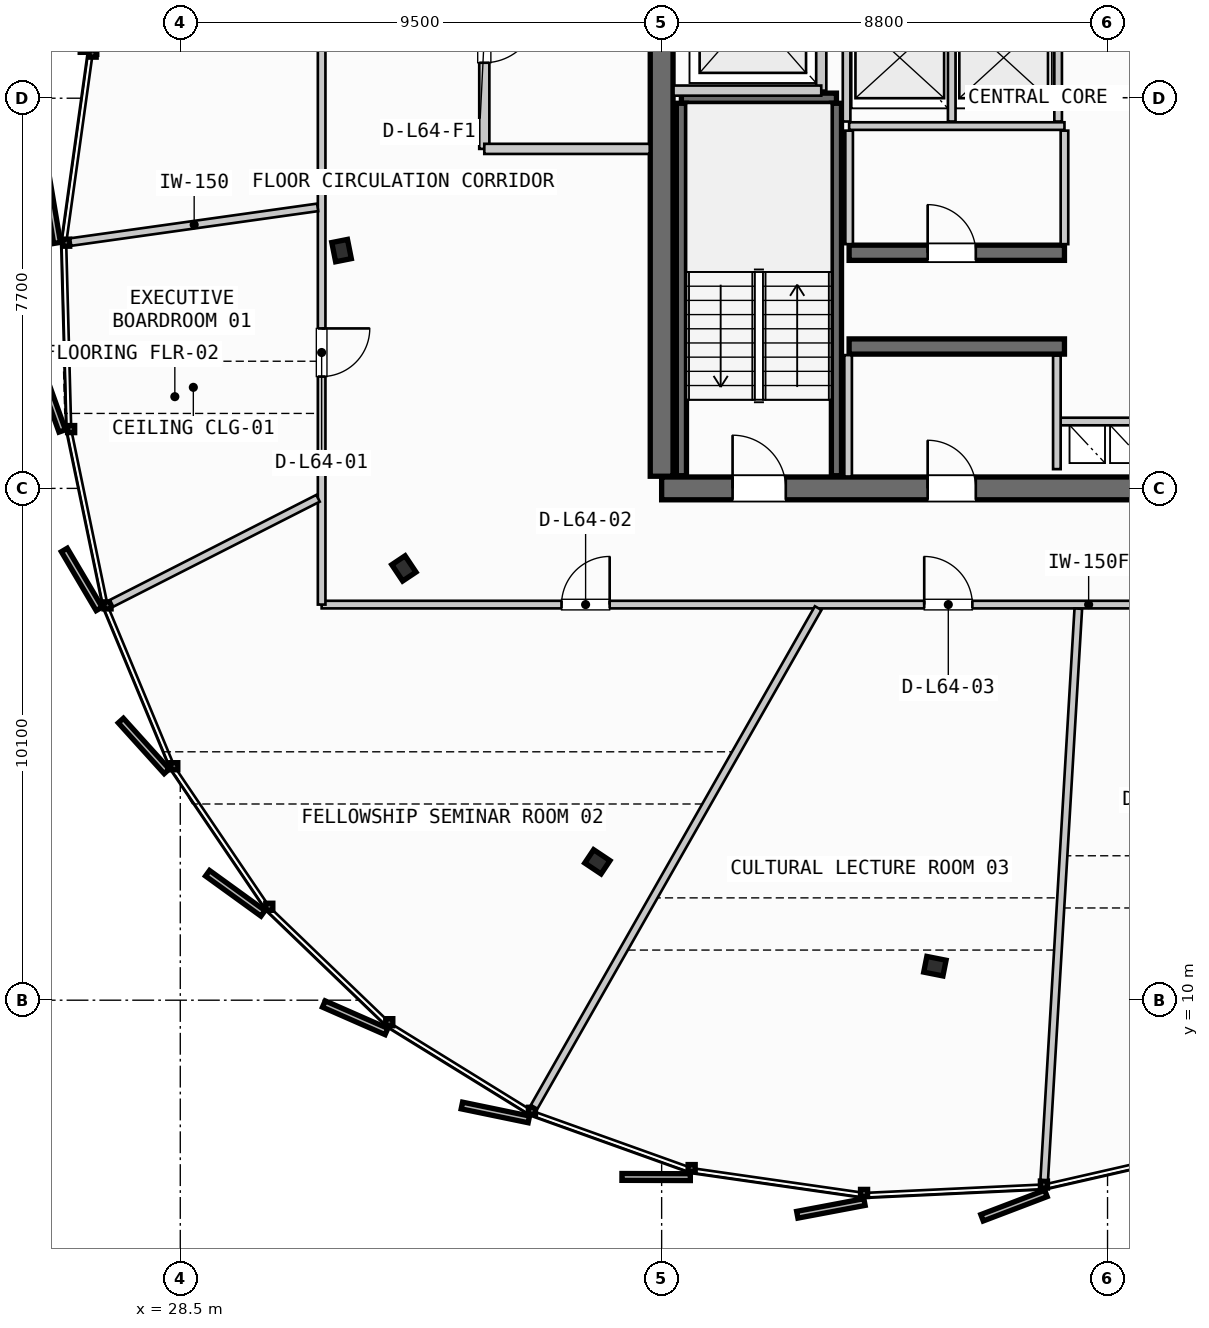
"""IFC4 building model, lengths in metres.
Left out: names, types, materials, properties, quantities, classifications, styles, units other than length and angle.
Written with IfcOpenShell. Run it as: python <this file> out.ifc"""

import sys

from ifc_helpers import new_model, si_unit, direction, frame, frame_2d, origin, origin_2d, place, context, subcontext, project, spatial, rectangle, i_section, extrude, source, transform, mapped, element, fill, save


model = new_model("IFC4")
c1 = context("Model", 3, precision=1e-05, world=origin(), true_north=direction((0.0, 1.0)))
c2 = subcontext(c1, "Body", "Model", "MODEL_VIEW")
j1 = project(units=[si_unit("LENGTHUNIT", "METRE"), si_unit("PLANEANGLEUNIT", "RADIAN")], contexts=[c1])
p1 = place(None, origin())
s1 = spatial("IfcSite", under=j1, at=p1, CompositionType="ELEMENT")
p2 = place(p1, origin())
s2 = spatial("IfcBuilding", under=s1, at=p2, CompositionType="ELEMENT")
p3 = place(p2, frame((0.0, 0.0, 245.65)))
s3 = spatial("IfcBuildingStorey", under=s2, at=p3, CompositionType="ELEMENT", Elevation=245.65)
p4 = place(p3, frame((38.0, 20.1, 0.0), z_axis=(0.0, 0.0, 1.0), x_axis=(1.0, 0.0, 0.0)))
e1 = element("IfcWall", 1, at=p4, inside=s3, PredefinedType="SHEAR", context=c2, shape_type="SweptSolid", body=[
    extrude(rectangle(XDim=17.6, YDim=0.45, at=frame_2d((8.8, 0.0))), origin(), (0.0, 0.0, 1.0), 3.21),
])
p5 = place(p4, frame((1.4, 0.0, 0.0)))
e2 = element("IfcOpeningElement", 2, at=p5, cuts=e1, PredefinedType="OPENING", context=c2, shape_type="SweptSolid", body=[
    extrude(rectangle(XDim=1.05, YDim=2.15, at=frame_2d((0.525, 1.075))), frame((0.0, 0.235, 0.0), z_axis=(0.0, -1.0, 0.0), x_axis=(1.0, 0.0, 0.0)), (0.0, 0.0, 1.0), 0.47),
])
p6 = place(p4, frame((15.15, 0.0, 0.0)))
e3 = element("IfcOpeningElement", 3, at=p6, cuts=e1, PredefinedType="OPENING", context=c2, shape_type="SweptSolid", body=[
    extrude(rectangle(XDim=1.05, YDim=2.15, at=frame_2d((0.525, 1.075))), frame((0.0, 0.235, 0.0), z_axis=(0.0, -1.0, 0.0), x_axis=(1.0, 0.0, 0.0)), (0.0, 0.0, 1.0), 0.47),
])
p7 = place(p4, frame((5.25, 0.0, 0.0)))
e4 = element("IfcOpeningElement", 4, at=p7, cuts=e1, PredefinedType="OPENING", context=c2, shape_type="SweptSolid", body=[
    extrude(rectangle(XDim=0.95, YDim=2.15, at=frame_2d((0.475, 1.075))), frame((0.0, 0.235, 0.0), z_axis=(0.0, -1.0, 0.0), x_axis=(1.0, 0.0, 0.0)), (0.0, 0.0, 1.0), 0.47),
])
p8 = place(p4, frame((11.4, 0.0, 0.0)))
e5 = element("IfcOpeningElement", 5, at=p8, cuts=e1, PredefinedType="OPENING", context=c2, shape_type="SweptSolid", body=[
    extrude(rectangle(XDim=0.95, YDim=2.15, at=frame_2d((0.475, 1.075))), frame((0.0, 0.235, 0.0), z_axis=(0.0, -1.0, 0.0), x_axis=(1.0, 0.0, 0.0)), (0.0, 0.0, 1.0), 0.47),
])
p9 = place(p3, frame((38.0, 35.26, 0.0), z_axis=(0.0, 0.0, 1.0), x_axis=(0.0, -1.0, 0.0)))
e6 = element("IfcWall", 6, at=p9, inside=s3, PredefinedType="SHEAR", context=c2, shape_type="SweptSolid", body=[
    extrude(rectangle(XDim=14.92, YDim=0.45, at=frame_2d((7.46, 0.0))), origin(), (0.0, 0.0, 1.0), 3.21),
])
p10 = place(p9, frame((5.21, 0.0, 0.0)))
e7 = element("IfcOpeningElement", 7, at=p10, cuts=e6, PredefinedType="OPENING", context=c2, shape_type="SweptSolid", body=[
    extrude(rectangle(XDim=1.1, YDim=2.2, at=frame_2d((0.55, 1.1))), frame((0.0, 0.235, 0.0), z_axis=(0.0, -1.0, 0.0), x_axis=(1.0, 0.0, 0.0)), (0.0, 0.0, 1.0), 0.47),
])
p11 = place(p3, frame((41.7, 22.9, 0.0), z_axis=(0.0, 0.0, 1.0), x_axis=(1.0, 0.0, 0.0)))
e8 = element("IfcWall", 8, at=p11, inside=s3, PredefinedType="SHEAR", context=c2, shape_type="SweptSolid", body=[
    extrude(rectangle(XDim=4.25, YDim=0.3, at=frame_2d((2.125, 0.0))), origin(), (0.0, 0.0, 1.0), 3.21),
])
p12 = place(p3, frame((41.7, 24.75, 0.0), z_axis=(0.0, 0.0, 1.0), x_axis=(1.0, 0.0, 0.0)))
e9 = element("IfcWall", 9, at=p12, inside=s3, PredefinedType="SHEAR", context=c2, shape_type="SweptSolid", body=[
    extrude(rectangle(XDim=4.25, YDim=0.3, at=frame_2d((2.125, 0.0))), origin(), (0.0, 0.0, 1.0), 3.21),
])
p13 = place(p12, frame((1.55, 0.0, 0.0)))
e10 = element("IfcOpeningElement", 10, at=p13, cuts=e9, PredefinedType="OPENING", context=c2, shape_type="SweptSolid", body=[
    extrude(rectangle(XDim=0.95, YDim=2.15, at=frame_2d((0.475, 1.075))), frame((0.0, 0.16, 0.0), z_axis=(0.0, -1.0, 0.0), x_axis=(1.0, 0.0, 0.0)), (0.0, 0.0, 1.0), 0.32),
])
m1 = source(origin(), c2, "Body", "SweptSolid", [
    extrude(i_section(OverallWidth=0.387, OverallDepth=0.316, WebThickness=0.019, FlangeThickness=0.028, FilletRadius=0.015, at=origin_2d()), origin(), (0.0, 0.0, 1.0), 3.21),
])
for number, where, z_axis, x_axis in (
    (11, (31.683, 24.793, 0.0), (0.0, 0.0, 1.0), (-0.981, -0.195, 0.0)),
    (12, (32.913, 18.521, 0.0), (0.0, 0.0, 1.0), (-0.831, -0.556, 0.0)),
    (13, (36.731, 12.731, 0.0), (0.0, 0.0, 1.0), (-0.556, -0.831, 0.0)),
    (14, (43.393, 10.671, 0.0), (0.0, 0.0, 1.0), (-0.195, -0.981, 0.0)),
):
    element("IfcColumn", number, at=place(p3, frame(where, z_axis=z_axis, x_axis=x_axis)), inside=s3, PredefinedType="COLUMN", context=c2, shape_type="MappedRepresentation", body=[
        mapped(m1, transform((0.0, 0.0, 0.0), scale=1.0)),
    ])
p14 = place(p3, frame((38.39, 27.8, 0.0), z_axis=(0.0, 0.0, 1.0), x_axis=(1.0, 0.0, 0.0)))
e15 = element("IfcWall", 15, at=p14, inside=s3, PredefinedType="SHEAR", context=c2, shape_type="SweptSolid", body=[
    extrude(rectangle(XDim=3.06, YDim=0.2, at=frame_2d((1.53, 0.0))), origin(), (0.0, 0.0, 1.0), 3.21),
])
for number, where, z_axis, x_axis in (
    (16, (41.45, 27.7, 0.0), (0.0, 0.0, 1.0), (0.0, -1.0, 0.0)),
    (17, (38.39, 20.35, 0.0), (0.0, 0.0, 1.0), (0.0, 1.0, 0.0)),
):
    element("IfcWall", number, at=place(p3, frame(where, z_axis=z_axis, x_axis=x_axis)), inside=s3, PredefinedType="SHEAR", context=c2, shape_type="SweptSolid", body=[
        extrude(rectangle(XDim=7.35, YDim=0.2, at=frame_2d((3.675, 0.0))), origin(), (0.0, 0.0, 1.0), 3.21),
    ])
p15 = place(p3, frame((45.8, 21.42, 0.0), z_axis=(0.0, 0.0, 1.0), x_axis=(1.0, 0.0, 0.0)))
e18 = element("IfcWall", 18, at=p15, inside=s3, PredefinedType="PARTITIONING", context=c2, shape_type="SweptSolid", body=[
    extrude(rectangle(XDim=2.0, YDim=0.15, at=frame_2d((1.0, 0.0))), origin(), (0.0, 0.0, 1.0), 2.28),
])
p16 = place(p3, frame((45.8, 20.48, 0.0), z_axis=(0.0, 0.0, 1.0), x_axis=(0.0, 1.0, 0.0)))
e19 = element("IfcWall", 19, at=p16, inside=s3, PredefinedType="PARTITIONING", context=c2, shape_type="SweptSolid", body=[
    extrude(rectangle(XDim=2.24, YDim=0.15, at=frame_2d((1.12, 0.0))), origin(), (0.0, 0.0, 1.0), 2.28),
])
p17 = place(p3, frame((41.15, 27.95, 0.0), z_axis=(0.0, 0.0, 1.0), x_axis=(0.0, 1.0, 0.0)))
e20 = element("IfcWall", 20, at=p17, inside=s3, PredefinedType="PARTITIONING", context=c2, shape_type="SweptSolid", body=[
    extrude(rectangle(XDim=3.1, YDim=0.2, at=frame_2d((1.55, 0.0))), origin(), (0.0, 0.0, 1.0), 2.28),
])
p18 = place(p3, frame((38.235, 27.95, 0.0), z_axis=(0.0, 0.0, 1.0), x_axis=(1.0, 0.0, 0.0)))
e21 = element("IfcWall", 21, at=p18, inside=s3, PredefinedType="PARTITIONING", context=c2, shape_type="SweptSolid", body=[
    extrude(rectangle(XDim=2.915, YDim=0.2, at=frame_2d((1.458, 0.0))), origin(), (0.0, 0.0, 1.0), 2.28),
])
p19 = place(p3, frame((34.5, 31.2, 0.0), z_axis=(0.0, 0.0, 1.0), x_axis=(0.0, -1.0, 0.0)))
e22 = element("IfcWall", 22, at=p19, inside=s3, PredefinedType="PARTITIONING", context=c2, shape_type="SweptSolid", body=[
    extrude(rectangle(XDim=4.4, YDim=0.2, at=frame_2d((2.2, 0.0))), origin(), (0.0, 0.0, 1.0), 2.28),
])
p20 = place(p19, frame((1.65, 0.0, 0.0)))
e23 = element("IfcOpeningElement", 23, at=p20, cuts=e22, PredefinedType="OPENING", context=c2, shape_type="SweptSolid", body=[
    extrude(rectangle(XDim=1.05, YDim=2.15, at=frame_2d((0.525, 1.075))), frame((0.0, 0.11, 0.0), z_axis=(0.0, -1.0, 0.0), x_axis=(1.0, 0.0, 0.0)), (0.0, 0.0, 1.0), 0.22),
])
p21 = place(p3, frame((34.5, 26.8, 0.0), z_axis=(0.0, 0.0, 1.0), x_axis=(1.0, 0.0, 0.0)))
e24 = element("IfcWall", 24, at=p21, inside=s3, PredefinedType="PARTITIONING", context=c2, shape_type="SweptSolid", body=[
    extrude(rectangle(XDim=3.265, YDim=0.2, at=frame_2d((1.632, 0.0))), origin(), (0.0, 0.0, 1.0), 2.28),
])
p22 = place(p3, frame((41.68, 20.335, 0.0), z_axis=(0.0, 0.0, 1.0), x_axis=(0.0, 1.0, 0.0)))
e25 = element("IfcWall", 25, at=p22, inside=s3, PredefinedType="PARTITIONING", context=c2, shape_type="SweptSolid", body=[
    extrude(rectangle(XDim=2.395, YDim=0.15, at=frame_2d((1.198, 0.0))), origin(), (0.0, 0.0, 1.0), 2.28),
])
p23 = place(p3, frame((41.7, 27.25, 0.0), z_axis=(0.0, 0.0, 1.0), x_axis=(1.0, 0.0, 0.0)))
e26 = element("IfcWall", 26, at=p23, inside=s3, PredefinedType="PARTITIONING", context=c2, shape_type="SweptSolid", body=[
    extrude(rectangle(XDim=4.25, YDim=0.15, at=frame_2d((2.125, 0.0))), origin(), (0.0, 0.0, 1.0), 2.28),
])
for number, where, z_axis, x_axis in (
    (27, (41.7, 24.92, 0.0), (0.0, 0.0, 1.0), (0.0, 1.0, 0.0)),
    (28, (45.95, 24.92, 0.0), (0.0, 0.0, 1.0), (0.0, 1.0, 0.0)),
):
    element("IfcWall", number, at=place(p3, frame(where, z_axis=z_axis, x_axis=x_axis)), inside=s3, PredefinedType="PARTITIONING", context=c2, shape_type="SweptSolid", body=[
        extrude(rectangle(XDim=2.24, YDim=0.15, at=frame_2d((1.12, 0.0))), origin(), (0.0, 0.0, 1.0), 2.28),
    ])
for number, where, z_axis, x_axis in (
    (29, (41.65, 27.34, 0.0), (0.0, 0.0, 1.0), (0.0, 1.0, 0.0)),
    (30, (43.725, 27.34, 0.0), (0.0, 0.0, 1.0), (0.0, 1.0, 0.0)),
    (31, (45.825, 27.34, 0.0), (0.0, 0.0, 1.0), (0.0, 1.0, 0.0)),
):
    element("IfcWall", number, at=place(p3, frame(where, z_axis=z_axis, x_axis=x_axis)), inside=s3, PredefinedType="PARTITIONING", context=c2, shape_type="SweptSolid", body=[
        extrude(rectangle(XDim=2.34, YDim=0.15, at=frame_2d((1.17, 0.0))), origin(), (0.0, 0.0, 1.0), 2.28),
    ])
p24 = place(p3, frame((31.29, 17.807, 0.0), z_axis=(0.0, 0.0, 1.0), x_axis=(1.0, 0.0, 0.0)))
e32 = element("IfcWall", 32, at=p24, inside=s3, PredefinedType="PARTITIONING", context=c2, shape_type="SweptSolid", body=[
    extrude(rectangle(XDim=30.274, YDim=0.15, at=frame_2d((15.137, 0.0))), origin(), (0.0, 0.0, 1.0), 2.28),
])
p25 = place(p24, frame((4.734, 0.0, 0.0)))
e33 = element("IfcOpeningElement", 33, at=p25, cuts=e32, PredefinedType="OPENING", context=c2, shape_type="SweptSolid", body=[
    extrude(rectangle(XDim=0.95, YDim=2.15, at=frame_2d((0.475, 1.075))), frame((0.0, 0.085, 0.0), z_axis=(0.0, -1.0, 0.0), x_axis=(1.0, 0.0, 0.0)), (0.0, 0.0, 1.0), 0.17),
])
p26 = place(p24, frame((11.892, 0.0, 0.0)))
e34 = element("IfcOpeningElement", 34, at=p26, cuts=e32, PredefinedType="OPENING", context=c2, shape_type="SweptSolid", body=[
    extrude(rectangle(XDim=0.95, YDim=2.15, at=frame_2d((0.475, 1.075))), frame((0.0, 0.085, 0.0), z_axis=(0.0, -1.0, 0.0), x_axis=(1.0, 0.0, 0.0)), (0.0, 0.0, 1.0), 0.17),
])
p27 = place(p24, frame((17.453, 0.0, 0.0)))
e35 = element("IfcOpeningElement", 35, at=p27, cuts=e32, PredefinedType="OPENING", context=c2, shape_type="SweptSolid", body=[
    extrude(rectangle(XDim=0.95, YDim=2.15, at=frame_2d((0.475, 1.075))), frame((0.0, 0.085, 0.0), z_axis=(0.0, -1.0, 0.0), x_axis=(1.0, 0.0, 0.0)), (0.0, 0.0, 1.0), 0.17),
])
p28 = place(p24, frame((24.251, 0.0, 0.0)))
e36 = element("IfcOpeningElement", 36, at=p28, cuts=e32, PredefinedType="OPENING", context=c2, shape_type="SweptSolid", body=[
    extrude(rectangle(XDim=0.95, YDim=2.15, at=frame_2d((0.475, 1.075))), frame((0.0, 0.085, 0.0), z_axis=(0.0, -1.0, 0.0), x_axis=(1.0, 0.0, 0.0)), (0.0, 0.0, 1.0), 0.17),
])
p29 = place(p3, frame((31.29, 37.793, 0.0), z_axis=(0.0, 0.0, 1.0), x_axis=(0.0, -1.0, 0.0)))
e37 = element("IfcWall", 37, at=p29, inside=s3, PredefinedType="PARTITIONING", context=c2, shape_type="SweptSolid", body=[
    extrude(rectangle(XDim=19.986, YDim=0.15, at=frame_2d((9.993, 0.0))), origin(), (0.0, 0.0, 1.0), 2.28),
])
p30 = place(p29, frame((14.536, 0.0, 0.0)))
e38 = element("IfcOpeningElement", 38, at=p30, cuts=e37, PredefinedType="OPENING", context=c2, shape_type="SweptSolid", body=[
    extrude(rectangle(XDim=0.95, YDim=2.15, at=frame_2d((0.475, 1.075))), frame((0.0, 0.085, 0.0), z_axis=(0.0, -1.0, 0.0), x_axis=(1.0, 0.0, 0.0)), (0.0, 0.0, 1.0), 0.17),
])
p31 = place(p29, frame((5.084, 0.0, 0.0)))
e39 = element("IfcOpeningElement", 39, at=p31, cuts=e37, PredefinedType="OPENING", context=c2, shape_type="SweptSolid", body=[
    extrude(rectangle(XDim=0.95, YDim=2.15, at=frame_2d((0.475, 1.075))), frame((0.0, 0.085, 0.0), z_axis=(0.0, -1.0, 0.0), x_axis=(1.0, 0.0, 0.0)), (0.0, 0.0, 1.0), 0.17),
])
p32 = place(p3, frame((31.211, 25.646, 0.0), z_axis=(0.0, 0.0, 1.0), x_axis=(-0.990284031465, -0.139059472982, 0.0)))
e40 = element("IfcWall", 40, at=p32, inside=s3, PredefinedType="PARTITIONING", context=c2, shape_type="SweptSolid", body=[
    extrude(rectangle(XDim=4.921, YDim=0.15, at=frame_2d((2.46, 0.0))), origin(), (0.0, 0.0, 1.0), 2.28),
])
p33 = place(p3, frame((31.219, 19.905, 0.0), z_axis=(0.0, 0.0, 1.0), x_axis=(-0.891296966011, -0.453420024238, 0.0)))
e41 = element("IfcWall", 41, at=p33, inside=s3, PredefinedType="PARTITIONING", context=c2, shape_type="SweptSolid", body=[
    extrude(rectangle(XDim=4.571, YDim=0.15, at=frame_2d((2.285, 0.0))), origin(), (0.0, 0.0, 1.0), 2.28),
])
p34 = place(p3, frame((41.089, 17.738, 0.0), z_axis=(0.0, 0.0, 1.0), x_axis=(-0.494854670014, -0.86897575085, 0.0)))
e42 = element("IfcWall", 42, at=p34, inside=s3, PredefinedType="PARTITIONING", context=c2, shape_type="SweptSolid", body=[
    extrude(rectangle(XDim=11.326, YDim=0.15, at=frame_2d((5.663, 0.0))), origin(), (0.0, 0.0, 1.0), 2.28),
])
p35 = place(p3, frame((46.223, 17.727, 0.0), z_axis=(0.0, 0.0, 1.0), x_axis=(-0.059592486855, -0.998222788515, 0.0)))
e43 = element("IfcWall", 43, at=p35, inside=s3, PredefinedType="PARTITIONING", context=c2, shape_type="SweptSolid", body=[
    extrude(rectangle(XDim=11.295, YDim=0.15, at=frame_2d((5.647, 0.0))), origin(), (0.0, 0.0, 1.0), 2.28),
])
m2 = source(origin(), c2, "Body", "SweptSolid", [
    extrude(rectangle(XDim=1.05, YDim=2.15, at=frame_2d((0.525, 1.075))), frame((0.0, 0.025, 0.0), z_axis=(0.0, -1.0, 0.0), x_axis=(1.0, 0.0, 0.0)), (0.0, 0.0, 1.0), 0.05),
])
p36 = place(p5, origin())
e44 = element("IfcDoor", 44, at=p36, inside=s3, OperationType="SINGLE_SWING_LEFT", PredefinedType="DOOR", context=c2, shape_type="MappedRepresentation", body=[
    mapped(m2, transform((0.0, 0.0, 0.0), scale=1.0)),
])
fill(e2, e44)
m3 = source(origin(), c2, "Body", "SweptSolid", [
    extrude(rectangle(XDim=0.95, YDim=2.15, at=frame_2d((0.475, 1.075))), frame((0.0, 0.025, 0.0), z_axis=(0.0, -1.0, 0.0), x_axis=(1.0, 0.0, 0.0)), (0.0, 0.0, 1.0), 0.05),
])
p37 = place(p7, origin())
e45 = element("IfcDoor", 45, at=p37, inside=s3, OperationType="SINGLE_SWING_LEFT", PredefinedType="DOOR", context=c2, shape_type="MappedRepresentation", body=[
    mapped(m3, transform((0.0, 0.0, 0.0), scale=1.0)),
])
fill(e4, e45)
p38 = place(p13, origin())
e46 = element("IfcDoor", 46, at=p38, inside=s3, OperationType="SINGLE_SWING_LEFT", PredefinedType="DOOR", context=c2, shape_type="MappedRepresentation", body=[
    mapped(m3, transform((0.0, 0.0, 0.0), scale=1.0)),
])
fill(e10, e46)
p39 = place(p20, origin())
e47 = element("IfcDoor", 47, at=p39, inside=s3, OperationType="SINGLE_SWING_LEFT", PredefinedType="DOOR", context=c2, shape_type="MappedRepresentation", body=[
    mapped(m2, transform((0.0, 0.0, 0.0), scale=1.0)),
])
fill(e23, e47)
p40 = place(p25, origin())
e48 = element("IfcDoor", 48, at=p40, inside=s3, OperationType="SINGLE_SWING_RIGHT", PredefinedType="DOOR", context=c2, shape_type="MappedRepresentation", body=[
    mapped(m3, transform((0.0, 0.0, 0.0), scale=1.0)),
])
fill(e33, e48)
p41 = place(p26, origin())
e49 = element("IfcDoor", 49, at=p41, inside=s3, OperationType="SINGLE_SWING_LEFT", PredefinedType="DOOR", context=c2, shape_type="MappedRepresentation", body=[
    mapped(m3, transform((0.0, 0.0, 0.0), scale=1.0)),
])
fill(e34, e49)
p42 = place(p30, origin())
e50 = element("IfcDoor", 50, at=p42, inside=s3, OperationType="SINGLE_SWING_LEFT", PredefinedType="DOOR", context=c2, shape_type="MappedRepresentation", body=[
    mapped(m3, transform((0.0, 0.0, 0.0), scale=1.0)),
])
fill(e38, e50)
save(model, sys.argv[1])
